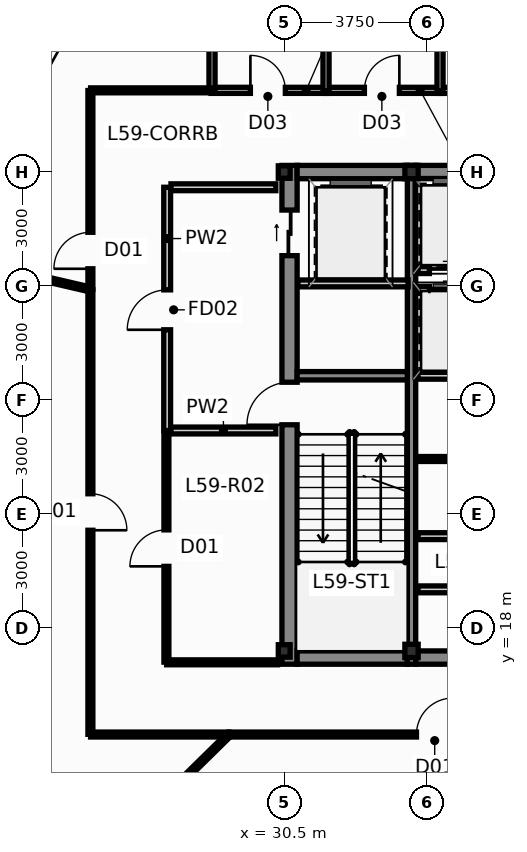
"""IFC4 building model, lengths in metres.
Left out: names, types, materials, properties, quantities, classifications, styles, units other than length and angle.
Written with IfcOpenShell. Run it as: python <this file> out.ifc"""

import sys

from ifc_helpers import new_model, si_unit, direction, frame, frame_2d, origin, origin_2d, place, context, subcontext, project, spatial, rectangle, hollow_rectangle, i_section, extrude, source, transform, mapped, element, fill, save


model = new_model("IFC4")
c1 = context("Model", 3, precision=1e-05, world=origin(), true_north=direction((0.0, 1.0)))
c2 = subcontext(c1, "Body", "Model", "MODEL_VIEW")
j1 = project(units=[si_unit("LENGTHUNIT", "METRE"), si_unit("PLANEANGLEUNIT", "RADIAN")], contexts=[c1])
p1 = place(None, origin())
s1 = spatial("IfcSite", under=j1, at=p1, CompositionType="ELEMENT")
p2 = place(p1, origin())
s2 = spatial("IfcBuilding", under=s1, at=p2, CompositionType="ELEMENT")
p3 = place(p2, frame((0.0, 0.0, 225.35)))
s3 = spatial("IfcBuildingStorey", under=s2, at=p3, CompositionType="ELEMENT", Elevation=225.35)
m1 = source(origin(), c2, "Body", "SweptSolid", [
    extrude(i_section(OverallWidth=0.311, OverallDepth=0.327, WebThickness=0.016, FlangeThickness=0.025, at=origin_2d()), origin(), (0.0, 0.0, 1.0), 4.5),
])
for number, where, z_axis, x_axis in (
    (1, (30.5, 17.4, 0.0), (0.0, 0.0, 1.0), (1.0, 0.0, 0.0)),
    (2, (30.5, 30.0, 0.0), (0.0, 0.0, 1.0), (1.0, 0.0, 0.0)),
):
    element("IfcColumn", number, at=place(p3, frame(where, z_axis=z_axis, x_axis=x_axis)), inside=s3, PredefinedType="COLUMN", context=c2, shape_type="MappedRepresentation", body=[
        mapped(m1, transform((0.0, 0.0, 0.0), scale=1.0)),
    ])
m2 = source(origin(), c2, "Body", "SweptSolid", [
    extrude(hollow_rectangle(XDim=0.35, YDim=0.35, WallThickness=0.016, at=origin_2d()), origin(), (0.0, 0.0, 1.0), 4.5),
])
for number, where, z_axis, x_axis in (
    (3, (33.85, 17.4, 0.0), (0.0, 0.0, 1.0), (1.0, 0.0, 0.0)),
    (4, (33.85, 30.0, 0.0), (0.0, 0.0, 1.0), (1.0, 0.0, 0.0)),
):
    element("IfcColumn", number, at=place(p3, frame(where, z_axis=z_axis, x_axis=x_axis)), inside=s3, PredefinedType="COLUMN", context=c2, shape_type="MappedRepresentation", body=[
        mapped(m2, transform((0.0, 0.0, 0.0), scale=1.0)),
    ])
p4 = place(p3, frame((30.64, 17.05, 0.0), z_axis=(0.0, 0.0, 1.0), x_axis=(0.0, 1.0, 0.0)))
e5 = element("IfcWall", 5, at=p4, inside=s3, PredefinedType="SHEAR", context=c2, shape_type="SweptSolid", body=[
    extrude(rectangle(XDim=13.125, YDim=0.4, at=frame_2d((6.562, 0.0))), origin(), (0.0, 0.0, 1.0), 4.5),
])
p5 = place(p4, frame((6.3, 0.0, 0.0)))
e6 = element("IfcOpeningElement", 6, at=p5, cuts=e5, PredefinedType="OPENING", context=c2, shape_type="SweptSolid", body=[
    extrude(rectangle(XDim=1.12, YDim=2.15, at=frame_2d((0.56, 1.075))), frame((0.0, 0.212, 0.0), z_axis=(0.0, -1.0, 0.0), x_axis=(1.0, 0.0, 0.0)), (0.0, 0.0, 1.0), 0.424),
])
p6 = place(p4, frame((10.75, 0.0, 0.0)))
e7 = element("IfcOpeningElement", 7, at=p6, cuts=e5, PredefinedType="OPENING", context=c2, shape_type="SweptSolid", body=[
    extrude(rectangle(XDim=1.2, YDim=2.2, at=frame_2d((0.6, 1.1))), frame((0.0, 0.212, 0.0), z_axis=(0.0, -1.0, 0.0), x_axis=(1.0, 0.0, 0.0)), (0.0, 0.0, 1.0), 0.424),
])
p7 = place(p3, frame((30.84, 17.225, 0.0), z_axis=(0.0, 0.0, 1.0), x_axis=(1.0, 0.0, 0.0)))
e8 = element("IfcWall", 8, at=p7, inside=s3, PredefinedType="SHEAR", context=c2, shape_type="SweptSolid", body=[
    extrude(rectangle(XDim=2.9, YDim=0.35, at=frame_2d((1.45, 0.0))), origin(), (0.0, 0.0, 1.0), 4.5),
])
p8 = place(p3, frame((33.96, 17.225, 0.0), z_axis=(0.0, 0.0, 1.0), x_axis=(1.0, 0.0, 0.0)))
e9 = element("IfcWall", 9, at=p8, inside=s3, PredefinedType="SHEAR", context=c2, shape_type="SweptSolid", body=[
    extrude(rectangle(XDim=8.08, YDim=0.35, at=frame_2d((4.04, 0.0))), origin(), (0.0, 0.0, 1.0), 4.5),
])
p9 = place(p3, frame((30.84, 30.0, 0.0), z_axis=(0.0, 0.0, 1.0), x_axis=(1.0, 0.0, 0.0)))
e10 = element("IfcWall", 10, at=p9, inside=s3, PredefinedType="SHEAR", context=c2, shape_type="SweptSolid", body=[
    extrude(rectangle(XDim=2.9, YDim=0.35, at=frame_2d((1.45, 0.0))), origin(), (0.0, 0.0, 1.0), 4.5),
])
p10 = place(p3, frame((33.96, 30.0, 0.0), z_axis=(0.0, 0.0, 1.0), x_axis=(1.0, 0.0, 0.0)))
e11 = element("IfcWall", 11, at=p10, inside=s3, PredefinedType="SHEAR", context=c2, shape_type="SweptSolid", body=[
    extrude(rectangle(XDim=3.78, YDim=0.35, at=frame_2d((1.89, 0.0))), origin(), (0.0, 0.0, 1.0), 4.5),
])
p11 = place(p3, frame((33.85, 17.05, 0.0), z_axis=(0.0, 0.0, 1.0), x_axis=(0.0, 1.0, 0.0)))
e12 = element("IfcWall", 12, at=p11, inside=s3, PredefinedType="SHEAR", context=c2, shape_type="SweptSolid", body=[
    extrude(rectangle(XDim=13.125, YDim=0.22, at=frame_2d((6.562, 0.0))), origin(), (0.0, 0.0, 1.0), 4.5),
])
p12 = place(p3, frame((30.84, 24.64, 0.0), z_axis=(0.0, 0.0, 1.0), x_axis=(1.0, 0.0, 0.0)))
e13 = element("IfcWall", 13, at=p12, inside=s3, PredefinedType="SHEAR", context=c2, shape_type="SweptSolid", body=[
    extrude(rectangle(XDim=2.9, YDim=0.22, at=frame_2d((1.45, 0.0))), origin(), (0.0, 0.0, 1.0), 4.5),
])
p13 = place(p3, frame((34.02, 26.9, 0.0), z_axis=(0.0, 0.0, 1.0), x_axis=(1.0, 0.0, 0.0)))
e14 = element("IfcWall", 14, at=p13, inside=s3, PredefinedType="PARTITIONING", context=c2, shape_type="SweptSolid", body=[
    extrude(rectangle(XDim=3.6, YDim=0.18, at=frame_2d((1.8, 0.0))), origin(), (0.0, 0.0, 1.0), 4.25),
])
p14 = place(p13, frame((0.3, 0.0, 0.0)))
e15 = element("IfcOpeningElement", 15, at=p14, cuts=e14, PredefinedType="OPENING", context=c2, shape_type="SweptSolid", body=[
    extrude(rectangle(XDim=1.15, YDim=2.2, at=frame_2d((0.575, 1.1))), frame((0.0, 0.102, 0.0), z_axis=(0.0, -1.0, 0.0), x_axis=(1.0, 0.0, 0.0)), (0.0, 0.0, 1.0), 0.204),
])
p15 = place(p13, frame((2.1, 0.0, 0.0)))
e16 = element("IfcOpeningElement", 16, at=p15, cuts=e14, PredefinedType="OPENING", context=c2, shape_type="SweptSolid", body=[
    extrude(rectangle(XDim=1.15, YDim=2.2, at=frame_2d((0.575, 1.1))), frame((0.0, 0.102, 0.0), z_axis=(0.0, -1.0, 0.0), x_axis=(1.0, 0.0, 0.0)), (0.0, 0.0, 1.0), 0.204),
])
p16 = place(p3, frame((34.02, 24.64, 0.0), z_axis=(0.0, 0.0, 1.0), x_axis=(1.0, 0.0, 0.0)))
e17 = element("IfcWall", 17, at=p16, inside=s3, PredefinedType="PARTITIONING", context=c2, shape_type="SweptSolid", body=[
    extrude(rectangle(XDim=3.68, YDim=0.18, at=frame_2d((1.84, 0.0))), origin(), (0.0, 0.0, 1.0), 4.25),
])
p17 = place(p3, frame((34.02, 27.42, 0.0), z_axis=(0.0, 0.0, 1.0), x_axis=(1.0, 0.0, 0.0)))
e18 = element("IfcWall", 18, at=p17, inside=s3, PredefinedType="PARTITIONING", context=c2, shape_type="SweptSolid", body=[
    extrude(rectangle(XDim=3.66, YDim=0.18, at=frame_2d((1.83, 0.0))), origin(), (0.0, 0.0, 1.0), 4.25),
])
p18 = place(p17, frame((0.3, 0.0, 0.0)))
e19 = element("IfcOpeningElement", 19, at=p18, cuts=e18, PredefinedType="OPENING", context=c2, shape_type="SweptSolid", body=[
    extrude(rectangle(XDim=1.15, YDim=2.2, at=frame_2d((0.575, 1.1))), frame((0.0, 0.102, 0.0), z_axis=(0.0, -1.0, 0.0), x_axis=(1.0, 0.0, 0.0)), (0.0, 0.0, 1.0), 0.204),
])
p19 = place(p17, frame((2.1, 0.0, 0.0)))
e20 = element("IfcOpeningElement", 20, at=p19, cuts=e18, PredefinedType="OPENING", context=c2, shape_type="SweptSolid", body=[
    extrude(rectangle(XDim=1.15, YDim=2.2, at=frame_2d((0.575, 1.1))), frame((0.0, 0.102, 0.0), z_axis=(0.0, -1.0, 0.0), x_axis=(1.0, 0.0, 0.0)), (0.0, 0.0, 1.0), 0.204),
])
p20 = place(p3, frame((27.42, 23.2, 0.0), z_axis=(0.0, 0.0, 1.0), x_axis=(0.0, 1.0, 0.0)))
e21 = element("IfcWall", 21, at=p20, inside=s3, PredefinedType="PARTITIONING", context=c2, shape_type="SweptSolid", body=[
    extrude(rectangle(XDim=6.4, YDim=0.18, at=frame_2d((3.2, 0.0))), origin(), (0.0, 0.0, 1.0), 3.935),
])
p21 = place(p20, frame((2.65, 0.0, 0.0)))
e22 = element("IfcOpeningElement", 22, at=p21, cuts=e21, PredefinedType="OPENING", context=c2, shape_type="SweptSolid", body=[
    extrude(rectangle(XDim=1.05, YDim=2.15, at=frame_2d((0.525, 1.075))), frame((0.0, 0.102, 0.0), z_axis=(0.0, -1.0, 0.0), x_axis=(1.0, 0.0, 0.0)), (0.0, 0.0, 1.0), 0.204),
])
p22 = place(p3, frame((27.52, 23.2, 0.0), z_axis=(0.0, 0.0, 1.0), x_axis=(1.0, 0.0, 0.0)))
e23 = element("IfcWall", 23, at=p22, inside=s3, PredefinedType="PARTITIONING", context=c2, shape_type="SweptSolid", body=[
    extrude(rectangle(XDim=2.76, YDim=0.18, at=frame_2d((1.38, 0.0))), origin(), (0.0, 0.0, 1.0), 4.25),
])
p23 = place(p3, frame((27.52, 29.6, 0.0), z_axis=(0.0, 0.0, 1.0), x_axis=(1.0, 0.0, 0.0)))
e24 = element("IfcWall", 24, at=p23, inside=s3, PredefinedType="PARTITIONING", context=c2, shape_type="SweptSolid", body=[
    extrude(rectangle(XDim=2.76, YDim=0.18, at=frame_2d((1.38, 0.0))), origin(), (0.0, 0.0, 1.0), 3.835),
])
p24 = place(p3, frame((30.86, 27.07, 0.0), z_axis=(0.0, 0.0, 1.0), x_axis=(1.0, 0.0, 0.0)))
e25 = element("IfcWall", 25, at=p24, inside=s3, PredefinedType="PARTITIONING", context=c2, shape_type="SweptSolid", body=[
    extrude(rectangle(XDim=2.9, YDim=0.18, at=frame_2d((1.45, 0.0))), origin(), (0.0, 0.0, 1.0), 4.25),
])
p25 = place(p3, frame((34.02, 20.42, 0.0), z_axis=(0.0, 0.0, 1.0), x_axis=(1.0, 0.0, 0.0)))
e26 = element("IfcWall", 26, at=p25, inside=s3, PredefinedType="PARTITIONING", context=c2, shape_type="SweptSolid", body=[
    extrude(rectangle(XDim=3.64, YDim=0.18, at=frame_2d((1.82, 0.0))), origin(), (0.0, 0.0, 1.0), 4.25),
])
p26 = place(p3, frame((34.02, 22.45, 0.0), z_axis=(0.0, 0.0, 1.0), x_axis=(1.0, 0.0, 0.0)))
e27 = element("IfcWall", 27, at=p26, inside=s3, PredefinedType="PARTITIONING", context=c2, shape_type="SweptSolid", body=[
    extrude(rectangle(XDim=3.58, YDim=0.13, at=frame_2d((1.79, 0.0))), origin(), (0.0, 0.0, 1.0), 4.25),
])
p27 = place(p3, frame((34.02, 19.02, 0.0), z_axis=(0.0, 0.0, 1.0), x_axis=(1.0, 0.0, 0.0)))
e28 = element("IfcWall", 28, at=p27, inside=s3, PredefinedType="PARTITIONING", context=c2, shape_type="SweptSolid", body=[
    extrude(rectangle(XDim=3.58, YDim=0.18, at=frame_2d((1.79, 0.0))), origin(), (0.0, 0.0, 1.0), 4.25),
])
p28 = place(p3, frame((28.575, 32.15, 0.0), z_axis=(0.0, 0.0, 1.0), x_axis=(1.0, 0.0, 0.0)))
e29 = element("IfcWall", 29, at=p28, inside=s3, PredefinedType="PLUMBINGWALL", context=c2, shape_type="SweptSolid", body=[
    extrude(rectangle(XDim=3.05, YDim=0.16, at=frame_2d((1.525, 0.0))), origin(), (0.0, 0.0, 1.0), 3.935),
])
p29 = place(p28, frame((1.035, 0.0, 0.0)))
e30 = element("IfcOpeningElement", 30, at=p29, cuts=e29, PredefinedType="OPENING", context=c2, shape_type="SweptSolid", body=[
    extrude(rectangle(XDim=0.92, YDim=2.1, at=frame_2d((0.46, 1.05))), frame((0.0, 0.092, 0.0), z_axis=(0.0, -1.0, 0.0), x_axis=(1.0, 0.0, 0.0)), (0.0, 0.0, 1.0), 0.184),
])
p30 = place(p3, frame((31.575, 32.15, 0.0), z_axis=(0.0, 0.0, 1.0), x_axis=(1.0, 0.0, 0.0)))
e31 = element("IfcWall", 31, at=p30, inside=s3, PredefinedType="PLUMBINGWALL", context=c2, shape_type="SweptSolid", body=[
    extrude(rectangle(XDim=3.05, YDim=0.16, at=frame_2d((1.525, 0.0))), origin(), (0.0, 0.0, 1.0), 3.935),
])
p31 = place(p30, frame((1.035, 0.0, 0.0)))
e32 = element("IfcOpeningElement", 32, at=p31, cuts=e31, PredefinedType="OPENING", context=c2, shape_type="SweptSolid", body=[
    extrude(rectangle(XDim=0.92, YDim=2.1, at=frame_2d((0.46, 1.05))), frame((0.0, 0.092, 0.0), z_axis=(0.0, -1.0, 0.0), x_axis=(1.0, 0.0, 0.0)), (0.0, 0.0, 1.0), 0.184),
])
p32 = place(p3, frame((34.575, 32.15, 0.0), z_axis=(0.0, 0.0, 1.0), x_axis=(1.0, 0.0, 0.0)))
e33 = element("IfcWall", 33, at=p32, inside=s3, PredefinedType="PLUMBINGWALL", context=c2, shape_type="SweptSolid", body=[
    extrude(rectangle(XDim=3.05, YDim=0.16, at=frame_2d((1.525, 0.0))), origin(), (0.0, 0.0, 1.0), 3.935),
])
p33 = place(p32, frame((1.035, 0.0, 0.0)))
e34 = element("IfcOpeningElement", 34, at=p33, cuts=e33, PredefinedType="OPENING", context=c2, shape_type="SweptSolid", body=[
    extrude(rectangle(XDim=0.92, YDim=2.1, at=frame_2d((0.46, 1.05))), frame((0.0, 0.092, 0.0), z_axis=(0.0, -1.0, 0.0), x_axis=(1.0, 0.0, 0.0)), (0.0, 0.0, 1.0), 0.184),
])
for number, where, z_axis, x_axis in (
    (35, (31.6, 32.125, 0.0), (0.0, 0.0, 1.0), (0.0, 1.0, 0.0)),
    (36, (28.6, 32.125, 0.0), (0.0, 0.0, 1.0), (0.0, 1.0, 0.0)),
):
    element("IfcWall", number, at=place(p3, frame(where, z_axis=z_axis, x_axis=x_axis)), inside=s3, PredefinedType="PLUMBINGWALL", context=c2, shape_type="SweptSolid", body=[
        extrude(rectangle(XDim=2.85, YDim=0.16, at=frame_2d((1.425, 0.0))), origin(), (0.0, 0.0, 1.0), 3.835),
    ])
p34 = place(p3, frame((34.6, 32.125, 0.0), z_axis=(0.0, 0.0, 1.0), x_axis=(0.0, 1.0, 0.0)))
e37 = element("IfcWall", 37, at=p34, inside=s3, PredefinedType="PLUMBINGWALL", context=c2, shape_type="SweptSolid", body=[
    extrude(rectangle(XDim=2.85, YDim=0.16, at=frame_2d((1.425, 0.0))), origin(), (0.0, 0.0, 1.0), 4.25),
])
p35 = place(p3, frame((25.4, 26.905, 0.0), z_axis=(0.0, 0.0, 1.0), x_axis=(0.0, -1.0, 0.0)))
e38 = element("IfcWall", 38, at=p35, inside=s3, PredefinedType="PARTITIONING", context=c2, shape_type="SweptSolid", body=[
    extrude(rectangle(XDim=11.7, YDim=0.13, at=frame_2d((5.85, 0.0))), origin(), (0.0, 0.0, 1.0), 3.935),
])
p36 = place(p35, frame((5.37, 0.0, 0.0)))
e39 = element("IfcOpeningElement", 39, at=p36, cuts=e38, PredefinedType="OPENING", context=c2, shape_type="SweptSolid", body=[
    extrude(rectangle(XDim=0.96, YDim=2.15, at=frame_2d((0.48, 1.075))), frame((0.0, 0.077, 0.0), z_axis=(0.0, -1.0, 0.0), x_axis=(1.0, 0.0, 0.0)), (0.0, 0.0, 1.0), 0.154),
])
p37 = place(p3, frame((29.055, 15.2, 0.0), z_axis=(0.0, 0.0, 1.0), x_axis=(1.0, 0.0, 0.0)))
e40 = element("IfcWall", 40, at=p37, inside=s3, PredefinedType="PARTITIONING", context=c2, shape_type="SweptSolid", body=[
    extrude(rectangle(XDim=10.81, YDim=0.13, at=frame_2d((5.405, 0.0))), origin(), (0.0, 0.0, 1.0), 3.935),
])
p38 = place(p37, frame((4.925, 0.0, 0.0)))
e41 = element("IfcOpeningElement", 41, at=p38, cuts=e40, PredefinedType="OPENING", context=c2, shape_type="SweptSolid", body=[
    extrude(rectangle(XDim=0.96, YDim=2.15, at=frame_2d((0.48, 1.075))), frame((0.0, 0.077, 0.0), z_axis=(0.0, -1.0, 0.0), x_axis=(1.0, 0.0, 0.0)), (0.0, 0.0, 1.0), 0.154),
])
p39 = place(p3, frame((21.827, 8.105, 0.0), z_axis=(0.0, 0.0, 1.0), x_axis=(0.713411545464, 0.700745293811, 0.0)))
e42 = element("IfcWall", 42, at=p39, inside=s3, PredefinedType="PARTITIONING", context=c2, shape_type="SweptSolid", body=[
    extrude(rectangle(XDim=10.119, YDim=0.13, at=frame_2d((5.06, 0.0))), origin(), (0.0, 0.0, 1.0), 4.25),
])
p40 = place(p3, frame((27.4, 17.105, 0.0), z_axis=(0.0, 0.0, 1.0), x_axis=(0.0, 1.0, 0.0)))
e43 = element("IfcWall", 43, at=p40, inside=s3, PredefinedType="PARTITIONING", context=c2, shape_type="SweptSolid", body=[
    extrude(rectangle(XDim=6.0, YDim=0.13, at=frame_2d((3.0, 0.0))), origin(), (0.0, 0.0, 1.0), 3.935),
])
p41 = place(p40, frame((2.52, 0.0, 0.0)))
e44 = element("IfcOpeningElement", 44, at=p41, cuts=e43, PredefinedType="OPENING", context=c2, shape_type="SweptSolid", body=[
    extrude(rectangle(XDim=0.96, YDim=2.15, at=frame_2d((0.48, 1.075))), frame((0.0, 0.077, 0.0), z_axis=(0.0, -1.0, 0.0), x_axis=(1.0, 0.0, 0.0)), (0.0, 0.0, 1.0), 0.154),
])
p42 = place(p3, frame((25.4, 26.915, 0.0), z_axis=(0.0, 0.0, 1.0), x_axis=(0.0, 1.0, 0.0)))
e45 = element("IfcWall", 45, at=p42, inside=s3, PredefinedType="PARTITIONING", context=c2, shape_type="SweptSolid", body=[
    extrude(rectangle(XDim=5.23, YDim=0.13, at=frame_2d((2.615, 0.0))), origin(), (0.0, 0.0, 1.0), 3.935),
])
p43 = place(p42, frame((0.54, 0.0, 0.0)))
e46 = element("IfcOpeningElement", 46, at=p43, cuts=e45, PredefinedType="OPENING", context=c2, shape_type="SweptSolid", body=[
    extrude(rectangle(XDim=0.96, YDim=2.15, at=frame_2d((0.48, 1.075))), frame((0.0, 0.077, 0.0), z_axis=(0.0, -1.0, 0.0), x_axis=(1.0, 0.0, 0.0)), (0.0, 0.0, 1.0), 0.154),
])
p44 = place(p3, frame((21.485, 27.818, 0.0), z_axis=(0.0, 0.0, 1.0), x_axis=(0.974127094836, -0.226000891828, 0.0)))
e47 = element("IfcWall", 47, at=p44, inside=s3, PredefinedType="PARTITIONING", context=c2, shape_type="SweptSolid", body=[
    extrude(rectangle(XDim=4.014, YDim=0.13, at=frame_2d((2.007, 0.0))), origin(), (0.0, 0.0, 1.0), 4.25),
])
p45 = place(p3, frame((25.405, 15.2, 0.0), z_axis=(0.0, 0.0, 1.0), x_axis=(1.0, 0.0, 0.0)))
e48 = element("IfcWall", 48, at=p45, inside=s3, PredefinedType="PARTITIONING", context=c2, shape_type="SweptSolid", body=[
    extrude(rectangle(XDim=3.64, YDim=0.13, at=frame_2d((1.82, 0.0))), origin(), (0.0, 0.0, 1.0), 3.935),
])
p46 = place(p3, frame((25.405, 32.15, 0.0), z_axis=(0.0, 0.0, 1.0), x_axis=(1.0, 0.0, 0.0)))
e49 = element("IfcWall", 49, at=p46, inside=s3, PredefinedType="PARTITIONING", context=c2, shape_type="SweptSolid", body=[
    extrude(rectangle(XDim=3.19, YDim=0.13, at=frame_2d((1.595, 0.0))), origin(), (0.0, 0.0, 1.0), 4.25),
])
p47 = place(p3, frame((30.325, 17.1, 0.0), z_axis=(0.0, 0.0, 1.0), x_axis=(-1.0, 0.0, 0.0)))
e50 = element("IfcWall", 50, at=p47, inside=s3, PredefinedType="PARTITIONING", context=c2, shape_type="SweptSolid", body=[
    extrude(rectangle(XDim=2.92, YDim=0.13, at=frame_2d((1.46, 0.0))), origin(), (0.0, 0.0, 1.0), 3.835),
])
p48 = place(p5, origin())
e51 = element("IfcDoor", 51, at=p48, inside=s3, OperationType="SINGLE_SWING_LEFT", PredefinedType="DOOR", context=c2, shape_type="SweptSolid", body=[
    extrude(rectangle(XDim=1.12, YDim=2.15, at=frame_2d((0.56, 1.075))), frame((0.0, 0.025, 0.0), z_axis=(0.0, -1.0, 0.0), x_axis=(1.0, 0.0, 0.0)), (0.0, 0.0, 1.0), 0.05),
])
fill(e6, e51)
p49 = place(p6, origin())
e52 = element("IfcDoor", 52, at=p49, inside=s3, OperationType="SLIDING_TO_LEFT", PredefinedType="DOOR", context=c2, shape_type="SweptSolid", body=[
    extrude(rectangle(XDim=1.2, YDim=2.2, at=frame_2d((0.6, 1.1))), frame((0.0, 0.025, 0.0), z_axis=(0.0, -1.0, 0.0), x_axis=(1.0, 0.0, 0.0)), (0.0, 0.0, 1.0), 0.05),
])
fill(e7, e52)
p50 = place(p14, origin())
e53 = element("IfcDoor", 53, at=p50, inside=s3, OperationType="SLIDING_TO_LEFT", PredefinedType="DOOR", context=c2, shape_type="SweptSolid", body=[
    extrude(rectangle(XDim=1.15, YDim=2.2, at=frame_2d((0.575, 1.1))), frame((0.0, 0.025, 0.0), z_axis=(0.0, -1.0, 0.0), x_axis=(1.0, 0.0, 0.0)), (0.0, 0.0, 1.0), 0.05),
])
fill(e15, e53)
p51 = place(p18, origin())
e54 = element("IfcDoor", 54, at=p51, inside=s3, OperationType="SLIDING_TO_RIGHT", PredefinedType="DOOR", context=c2, shape_type="SweptSolid", body=[
    extrude(rectangle(XDim=1.15, YDim=2.2, at=frame_2d((0.575, 1.1))), frame((0.0, 0.025, 0.0), z_axis=(0.0, -1.0, 0.0), x_axis=(1.0, 0.0, 0.0)), (0.0, 0.0, 1.0), 0.05),
])
fill(e19, e54)
p52 = place(p21, origin())
e55 = element("IfcDoor", 55, at=p52, inside=s3, OperationType="SINGLE_SWING_LEFT", PredefinedType="DOOR", context=c2, shape_type="SweptSolid", body=[
    extrude(rectangle(XDim=1.05, YDim=2.15, at=frame_2d((0.525, 1.075))), frame((0.0, 0.025, 0.0), z_axis=(0.0, -1.0, 0.0), x_axis=(1.0, 0.0, 0.0)), (0.0, 0.0, 1.0), 0.05),
])
fill(e22, e55)
p53 = place(p29, origin())
e56 = element("IfcDoor", 56, at=p53, inside=s3, OperationType="SINGLE_SWING_LEFT", PredefinedType="DOOR", context=c2, shape_type="SweptSolid", body=[
    extrude(rectangle(XDim=0.92, YDim=2.1, at=frame_2d((0.46, 1.05))), frame((0.0, 0.025, 0.0), z_axis=(0.0, -1.0, 0.0), x_axis=(1.0, 0.0, 0.0)), (0.0, 0.0, 1.0), 0.05),
])
fill(e30, e56)
p54 = place(p31, origin())
e57 = element("IfcDoor", 57, at=p54, inside=s3, OperationType="SINGLE_SWING_RIGHT", PredefinedType="DOOR", context=c2, shape_type="SweptSolid", body=[
    extrude(rectangle(XDim=0.92, YDim=2.1, at=frame_2d((0.46, 1.05))), frame((0.0, 0.025, 0.0), z_axis=(0.0, -1.0, 0.0), x_axis=(1.0, 0.0, 0.0)), (0.0, 0.0, 1.0), 0.05),
])
fill(e32, e57)
p55 = place(p36, origin())
e58 = element("IfcDoor", 58, at=p55, inside=s3, OperationType="SINGLE_SWING_RIGHT", PredefinedType="DOOR", context=c2, shape_type="SweptSolid", body=[
    extrude(rectangle(XDim=0.96, YDim=2.15, at=frame_2d((0.48, 1.075))), frame((0.0, 0.025, 0.0), z_axis=(0.0, -1.0, 0.0), x_axis=(1.0, 0.0, 0.0)), (0.0, 0.0, 1.0), 0.05),
])
fill(e39, e58)
p56 = place(p38, origin())
e59 = element("IfcDoor", 59, at=p56, inside=s3, OperationType="SINGLE_SWING_RIGHT", PredefinedType="DOOR", context=c2, shape_type="SweptSolid", body=[
    extrude(rectangle(XDim=0.96, YDim=2.15, at=frame_2d((0.48, 1.075))), frame((0.0, 0.025, 0.0), z_axis=(0.0, -1.0, 0.0), x_axis=(1.0, 0.0, 0.0)), (0.0, 0.0, 1.0), 0.05),
])
fill(e41, e59)
p57 = place(p41, origin())
e60 = element("IfcDoor", 60, at=p57, inside=s3, OperationType="SINGLE_SWING_LEFT", PredefinedType="DOOR", context=c2, shape_type="SweptSolid", body=[
    extrude(rectangle(XDim=0.96, YDim=2.15, at=frame_2d((0.48, 1.075))), frame((0.0, 0.025, 0.0), z_axis=(0.0, -1.0, 0.0), x_axis=(1.0, 0.0, 0.0)), (0.0, 0.0, 1.0), 0.05),
])
fill(e44, e60)
p58 = place(p43, origin())
e61 = element("IfcDoor", 61, at=p58, inside=s3, OperationType="SINGLE_SWING_LEFT", PredefinedType="DOOR", context=c2, shape_type="SweptSolid", body=[
    extrude(rectangle(XDim=0.96, YDim=2.15, at=frame_2d((0.48, 1.075))), frame((0.0, 0.025, 0.0), z_axis=(0.0, -1.0, 0.0), x_axis=(1.0, 0.0, 0.0)), (0.0, 0.0, 1.0), 0.05),
])
fill(e46, e61)
save(model, sys.argv[1])
